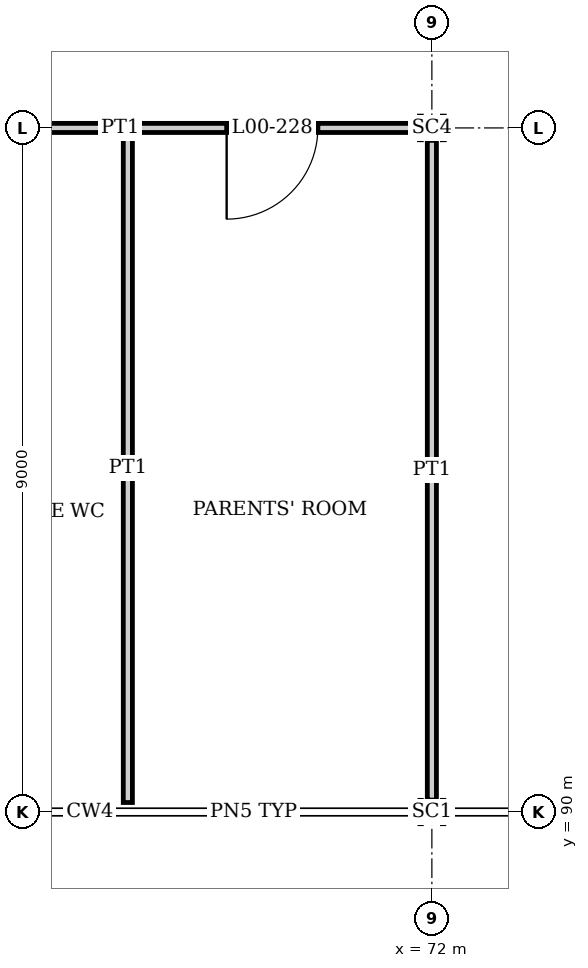
"""IFC4 building model, lengths in metres.
Left out: names, types, materials, properties, quantities, classifications, styles, units other than length and angle.
Written with IfcOpenShell. Run it as: python <this file> out.ifc"""

import sys

from ifc_helpers import new_model, si_unit, direction, frame, frame_2d, origin, origin_2d, place, context, subcontext, project, spatial, rectangle, i_section, extrude, element, fill, save


model = new_model("IFC4")
c1 = context("Model", 3, precision=1e-05, world=origin(), true_north=direction((0.0, 1.0)))
c2 = subcontext(c1, "Body", "Model", "MODEL_VIEW")
j1 = project(units=[si_unit("LENGTHUNIT", "METRE"), si_unit("PLANEANGLEUNIT", "RADIAN")], contexts=[c1])
p1 = place(None, origin())
s1 = spatial("IfcSite", under=j1, at=p1, CompositionType="ELEMENT")
p2 = place(p1, origin())
s2 = spatial("IfcBuilding", under=s1, at=p2, CompositionType="ELEMENT")
p3 = place(p2, origin())
s3 = spatial("IfcBuildingStorey", under=s2, at=p3, CompositionType="ELEMENT", Elevation=0.0)
p4 = place(p3, frame((72.0, 90.0, 0.0), z_axis=(0.0, 0.0, 1.0), x_axis=(0.0, 1.0, 0.0)))
e1 = element("IfcColumn", 1, at=p4, inside=s3, PredefinedType="COLUMN", context=c2, shape_type="SweptSolid", body=[
    extrude(i_section(OverallWidth=0.307, OverallDepth=0.315, WebThickness=0.012, FlangeThickness=0.019, at=origin_2d()), origin(), (0.0, 0.0, 1.0), 6.0),
])
p5 = place(p3, frame((72.0, 99.0, 0.0), z_axis=(0.0, 0.0, 1.0), x_axis=(0.0, 1.0, 0.0)))
e2 = element("IfcColumn", 2, at=p5, inside=s3, PredefinedType="COLUMN", context=c2, shape_type="SweptSolid", body=[
    extrude(i_section(OverallWidth=0.311, OverallDepth=0.327, WebThickness=0.016, FlangeThickness=0.025, at=origin_2d()), origin(), (0.0, 0.0, 1.0), 6.0),
])
p6 = place(p3, frame((63.164, 99.0, 0.0), z_axis=(0.0, 0.0, 1.0), x_axis=(1.0, 0.0, 0.0)))
e3 = element("IfcWall", 3, at=p6, inside=s3, PredefinedType="PARTITIONING", context=c2, shape_type="SweptSolid", body=[
    extrude(rectangle(XDim=8.673, YDim=0.12, at=frame_2d((4.336, 0.0))), origin(), (0.0, 0.0, 1.0), 5.322),
])
p7 = place(p6, frame((2.136, 0.0, 0.0)))
e4 = element("IfcOpeningElement", 4, at=p7, cuts=e3, PredefinedType="OPENING", context=c2, shape_type="SweptSolid", body=[
    extrude(rectangle(XDim=1.2, YDim=2.1, at=frame_2d((0.6, 1.05))), frame((0.0, 0.07, 0.0), z_axis=(0.0, -1.0, 0.0), x_axis=(1.0, 0.0, 0.0)), (0.0, 0.0, 1.0), 0.14),
])
p8 = place(p6, frame((6.136, 0.0, 0.0)))
e5 = element("IfcOpeningElement", 5, at=p8, cuts=e3, PredefinedType="OPENING", context=c2, shape_type="SweptSolid", body=[
    extrude(rectangle(XDim=1.2, YDim=2.1, at=frame_2d((0.6, 1.05))), frame((0.0, 0.07, 0.0), z_axis=(0.0, -1.0, 0.0), x_axis=(1.0, 0.0, 0.0)), (0.0, 0.0, 1.0), 0.14),
])
p9 = place(p3, frame((68.0, 90.125, 0.0), z_axis=(0.0, 0.0, 1.0), x_axis=(0.0, 1.0, 0.0)))
e6 = element("IfcWall", 6, at=p9, inside=s3, PredefinedType="PARTITIONING", context=c2, shape_type="SweptSolid", body=[
    extrude(rectangle(XDim=8.815, YDim=0.12, at=frame_2d((4.407, 0.0))), origin(), (0.0, 0.0, 1.0), 5.322),
])
p10 = place(p3, frame((72.0, 90.157, 0.0), z_axis=(0.0, 0.0, 1.0), x_axis=(0.0, 1.0, 0.0)))
e7 = element("IfcWall", 7, at=p10, inside=s3, PredefinedType="PARTITIONING", context=c2, shape_type="SweptSolid", body=[
    extrude(rectangle(XDim=8.679, YDim=0.12, at=frame_2d((4.339, 0.0))), origin(), (0.0, 0.0, 1.0), 5.447),
])
p11 = place(p8, frame((1.2, 0.0, 0.0), z_axis=(0.0, 0.0, 1.0), x_axis=(-1.0, 0.0, 0.0)))
e8 = element("IfcDoor", 8, at=p11, inside=s3, OperationType="SINGLE_SWING_RIGHT", PredefinedType="DOOR", context=c2, shape_type="SweptSolid", body=[
    extrude(rectangle(XDim=1.2, YDim=2.1, at=frame_2d((0.6, 1.05))), frame((0.0, 0.025, 0.0), z_axis=(0.0, -1.0, 0.0), x_axis=(1.0, 0.0, 0.0)), (0.0, 0.0, 1.0), 0.05),
])
fill(e5, e8)
save(model, sys.argv[1])
